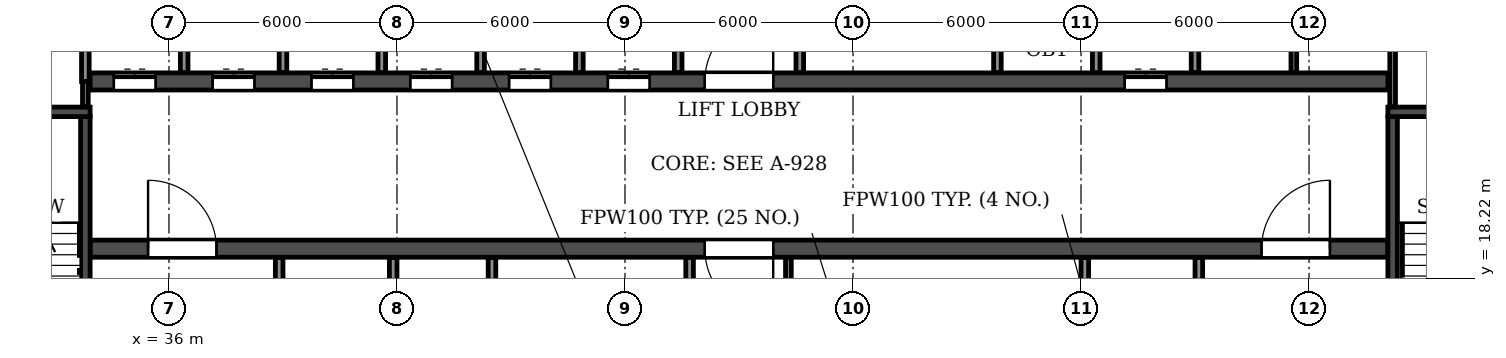
"""IFC4 building model, lengths in metres.
Left out: names, types, materials, properties, quantities, classifications, styles, units other than length and angle.
Written with IfcOpenShell. Run it as: python <this file> out.ifc"""

import sys

from ifc_helpers import new_model, si_unit, direction, frame, frame_2d, origin, place, context, subcontext, project, spatial, rectangle, extrude, element, fill, save


model = new_model("IFC4")
c1 = context("Model", 3, precision=1e-05, world=origin(), true_north=direction((0.0, 1.0)))
c2 = subcontext(c1, "Body", "Model", "MODEL_VIEW")
j1 = project(units=[si_unit("LENGTHUNIT", "METRE"), si_unit("PLANEANGLEUNIT", "RADIAN")], contexts=[c1])
p1 = place(None, origin())
s1 = spatial("IfcSite", under=j1, at=p1, CompositionType="ELEMENT")
p2 = place(p1, origin())
s2 = spatial("IfcBuilding", under=s1, at=p2, CompositionType="ELEMENT")
p3 = place(p2, frame((0.0, 0.0, 155.4)))
s3 = spatial("IfcBuildingStorey", under=s2, at=p3, CompositionType="ELEMENT", Elevation=155.4)
p4 = place(p3, frame((33.925, 19.0, 0.0), z_axis=(0.0, 0.0, 1.0), x_axis=(1.0, 0.0, 0.0)))
e1 = element("IfcWall", 1, at=p4, inside=s3, PredefinedType="SOLIDWALL", context=c2, shape_type="SweptSolid", body=[
    extrude(rectangle(XDim=34.15, YDim=0.45, at=frame_2d((17.075, 0.0))), origin(), (0.0, 0.0, 1.0), 3.0),
])
p5 = place(p4, frame((16.175, 0.0, 0.0)))
e2 = element("IfcOpeningElement", 2, at=p5, cuts=e1, PredefinedType="OPENING", context=c2, shape_type="SweptSolid", body=[
    extrude(rectangle(XDim=1.8, YDim=2.1, at=frame_2d((0.9, 1.05))), frame((0.0, 0.235, 0.0), z_axis=(0.0, -1.0, 0.0), x_axis=(1.0, 0.0, 0.0)), (0.0, 0.0, 1.0), 0.47),
])
p6 = place(p4, frame((1.525, 0.0, 0.0)))
e3 = element("IfcOpeningElement", 3, at=p6, cuts=e1, PredefinedType="OPENING", context=c2, shape_type="SweptSolid", body=[
    extrude(rectangle(XDim=1.8, YDim=2.1, at=frame_2d((0.9, 1.05))), frame((0.0, 0.235, 0.0), z_axis=(0.0, -1.0, 0.0), x_axis=(1.0, 0.0, 0.0)), (0.0, 0.0, 1.0), 0.47),
])
p7 = place(p4, frame((30.825, 0.0, 0.0)))
e4 = element("IfcOpeningElement", 4, at=p7, cuts=e1, PredefinedType="OPENING", context=c2, shape_type="SweptSolid", body=[
    extrude(rectangle(XDim=1.8, YDim=2.1, at=frame_2d((0.9, 1.05))), frame((0.0, 0.235, 0.0), z_axis=(0.0, -1.0, 0.0), x_axis=(1.0, 0.0, 0.0)), (0.0, 0.0, 1.0), 0.47),
])
p8 = place(p3, frame((33.925, 23.4, 0.0), z_axis=(0.0, 0.0, 1.0), x_axis=(1.0, 0.0, 0.0)))
e5 = element("IfcWall", 5, at=p8, inside=s3, PredefinedType="SOLIDWALL", context=c2, shape_type="SweptSolid", body=[
    extrude(rectangle(XDim=34.15, YDim=0.45, at=frame_2d((17.075, 0.0))), origin(), (0.0, 0.0, 1.0), 3.0),
])
p9 = place(p8, frame((16.175, 0.0, 0.0)))
e6 = element("IfcOpeningElement", 6, at=p9, cuts=e5, PredefinedType="OPENING", context=c2, shape_type="SweptSolid", body=[
    extrude(rectangle(XDim=1.8, YDim=2.1, at=frame_2d((0.9, 1.05))), frame((0.0, 0.235, 0.0), z_axis=(0.0, -1.0, 0.0), x_axis=(1.0, 0.0, 0.0)), (0.0, 0.0, 1.0), 0.47),
])
p10 = place(p8, frame((0.625, 0.0, 0.0)))
e7 = element("IfcOpeningElement", 7, at=p10, cuts=e5, PredefinedType="OPENING", context=c2, shape_type="SweptSolid", body=[
    extrude(rectangle(XDim=1.1, YDim=2.1, at=frame_2d((0.55, 1.05))), frame((0.0, 0.235, 0.0), z_axis=(0.0, -1.0, 0.0), x_axis=(1.0, 0.0, 0.0)), (0.0, 0.0, 1.0), 0.47),
])
p11 = place(p8, frame((3.225, 0.0, 0.0)))
e8 = element("IfcOpeningElement", 8, at=p11, cuts=e5, PredefinedType="OPENING", context=c2, shape_type="SweptSolid", body=[
    extrude(rectangle(XDim=1.1, YDim=2.1, at=frame_2d((0.55, 1.05))), frame((0.0, 0.235, 0.0), z_axis=(0.0, -1.0, 0.0), x_axis=(1.0, 0.0, 0.0)), (0.0, 0.0, 1.0), 0.47),
])
p12 = place(p8, frame((5.825, 0.0, 0.0)))
e9 = element("IfcOpeningElement", 9, at=p12, cuts=e5, PredefinedType="OPENING", context=c2, shape_type="SweptSolid", body=[
    extrude(rectangle(XDim=1.1, YDim=2.1, at=frame_2d((0.55, 1.05))), frame((0.0, 0.235, 0.0), z_axis=(0.0, -1.0, 0.0), x_axis=(1.0, 0.0, 0.0)), (0.0, 0.0, 1.0), 0.47),
])
p13 = place(p8, frame((8.425, 0.0, 0.0)))
e10 = element("IfcOpeningElement", 10, at=p13, cuts=e5, PredefinedType="OPENING", context=c2, shape_type="SweptSolid", body=[
    extrude(rectangle(XDim=1.1, YDim=2.1, at=frame_2d((0.55, 1.05))), frame((0.0, 0.235, 0.0), z_axis=(0.0, -1.0, 0.0), x_axis=(1.0, 0.0, 0.0)), (0.0, 0.0, 1.0), 0.47),
])
p14 = place(p8, frame((11.025, 0.0, 0.0)))
e11 = element("IfcOpeningElement", 11, at=p14, cuts=e5, PredefinedType="OPENING", context=c2, shape_type="SweptSolid", body=[
    extrude(rectangle(XDim=1.1, YDim=2.1, at=frame_2d((0.55, 1.05))), frame((0.0, 0.235, 0.0), z_axis=(0.0, -1.0, 0.0), x_axis=(1.0, 0.0, 0.0)), (0.0, 0.0, 1.0), 0.47),
])
p15 = place(p8, frame((13.625, 0.0, 0.0)))
e12 = element("IfcOpeningElement", 12, at=p15, cuts=e5, PredefinedType="OPENING", context=c2, shape_type="SweptSolid", body=[
    extrude(rectangle(XDim=1.1, YDim=2.1, at=frame_2d((0.55, 1.05))), frame((0.0, 0.235, 0.0), z_axis=(0.0, -1.0, 0.0), x_axis=(1.0, 0.0, 0.0)), (0.0, 0.0, 1.0), 0.47),
])
p16 = place(p8, frame((27.225, 0.0, 0.0)))
e13 = element("IfcOpeningElement", 13, at=p16, cuts=e5, PredefinedType="OPENING", context=c2, shape_type="SweptSolid", body=[
    extrude(rectangle(XDim=1.1, YDim=2.1, at=frame_2d((0.55, 1.05))), frame((0.0, 0.235, 0.0), z_axis=(0.0, -1.0, 0.0), x_axis=(1.0, 0.0, 0.0)), (0.0, 0.0, 1.0), 0.47),
])
p17 = place(p3, frame((33.8, 14.825, 0.0), z_axis=(0.0, 0.0, 1.0), x_axis=(0.0, 1.0, 0.0)))
e14 = element("IfcWall", 14, at=p17, inside=s3, PredefinedType="SOLIDWALL", context=c2, shape_type="SweptSolid", body=[
    extrude(rectangle(XDim=7.65, YDim=0.25, at=frame_2d((3.825, 0.0))), origin(), (0.0, 0.0, 1.0), 3.0),
])
p18 = place(p17, frame((0.475, 0.0, 0.0)))
e15 = element("IfcOpeningElement", 15, at=p18, cuts=e14, PredefinedType="OPENING", context=c2, shape_type="SweptSolid", body=[
    extrude(rectangle(XDim=1.0, YDim=2.1, at=frame_2d((0.5, 1.05))), frame((0.0, 0.135, 0.0), z_axis=(0.0, -1.0, 0.0), x_axis=(1.0, 0.0, 0.0)), (0.0, 0.0, 1.0), 0.27),
])
p19 = place(p3, frame((29.875, 22.6, 0.0), z_axis=(0.0, 0.0, 1.0), x_axis=(1.0, 0.0, 0.0)))
e16 = element("IfcWall", 16, at=p19, inside=s3, PredefinedType="SOLIDWALL", context=c2, shape_type="SweptSolid", body=[
    extrude(rectangle(XDim=4.05, YDim=0.25, at=frame_2d((2.025, 0.0))), origin(), (0.0, 0.0, 1.0), 3.0),
])
p20 = place(p3, frame((68.2, 14.825, 0.0), z_axis=(0.0, 0.0, 1.0), x_axis=(0.0, 1.0, 0.0)))
e17 = element("IfcWall", 17, at=p20, inside=s3, PredefinedType="SOLIDWALL", context=c2, shape_type="SweptSolid", body=[
    extrude(rectangle(XDim=7.65, YDim=0.25, at=frame_2d((3.825, 0.0))), origin(), (0.0, 0.0, 1.0), 3.0),
])
p21 = place(p20, frame((0.475, 0.0, 0.0)))
e18 = element("IfcOpeningElement", 18, at=p21, cuts=e17, PredefinedType="OPENING", context=c2, shape_type="SweptSolid", body=[
    extrude(rectangle(XDim=1.0, YDim=2.1, at=frame_2d((0.5, 1.05))), frame((0.0, 0.135, 0.0), z_axis=(0.0, -1.0, 0.0), x_axis=(1.0, 0.0, 0.0)), (0.0, 0.0, 1.0), 0.27),
])
p22 = place(p3, frame((68.075, 22.6, 0.0), z_axis=(0.0, 0.0, 1.0), x_axis=(1.0, 0.0, 0.0)))
e19 = element("IfcWall", 19, at=p22, inside=s3, PredefinedType="SOLIDWALL", context=c2, shape_type="SweptSolid", body=[
    extrude(rectangle(XDim=4.05, YDim=0.25, at=frame_2d((2.025, 0.0))), origin(), (0.0, 0.0, 1.0), 3.0),
])
for number, where, z_axis, x_axis in (
    (20, (52.3, 14.835, 0.0), (0.0, 0.0, 1.0), (0.0, 1.0, 0.0)),
    (21, (65.6, 23.635, 0.0), (0.0, 0.0, 1.0), (0.0, 1.0, 0.0)),
):
    element("IfcWall", number, at=place(p3, frame(where, z_axis=z_axis, x_axis=x_axis)), inside=s3, PredefinedType="PARTITIONING", context=c2, shape_type="SweptSolid", body=[
        extrude(rectangle(XDim=3.93, YDim=0.15, at=frame_2d((1.965, 0.0))), origin(), (0.0, 0.0, 1.0), 3.0),
    ])
for number, where, z_axis, x_axis in (
    (22, (44.5, 14.835, 0.0), (0.0, 0.0, 1.0), (0.0, 1.0, 0.0)),
    (23, (49.7, 14.835, 0.0), (0.0, 0.0, 1.0), (0.0, 1.0, 0.0)),
    (24, (52.6, 23.635, 0.0), (0.0, 0.0, 1.0), (0.0, 1.0, 0.0)),
):
    element("IfcWall", number, at=place(p3, frame(where, z_axis=z_axis, x_axis=x_axis)), inside=s3, PredefinedType="PARTITIONING", context=c2, shape_type="SweptSolid", body=[
        extrude(rectangle(XDim=3.93, YDim=0.2, at=frame_2d((1.965, 0.0))), origin(), (0.0, 0.0, 1.0), 3.0),
    ])
p23 = place(p3, frame((33.8, 22.735, 0.0), z_axis=(0.0, 0.0, 1.0), x_axis=(0.0, 1.0, 0.0)))
e25 = element("IfcWall", 25, at=p23, inside=s3, PredefinedType="PARTITIONING", context=c2, shape_type="SweptSolid", body=[
    extrude(rectangle(XDim=0.665, YDim=0.15, at=frame_2d((0.333, 0.0))), origin(), (0.0, 0.0, 1.0), 3.0),
])
p24 = place(p3, frame((68.2, 22.735, 0.0), z_axis=(0.0, 0.0, 1.0), x_axis=(0.0, 1.0, 0.0)))
e26 = element("IfcWall", 26, at=p24, inside=s3, PredefinedType="PARTITIONING", context=c2, shape_type="SweptSolid", body=[
    extrude(rectangle(XDim=4.83, YDim=0.15, at=frame_2d((2.415, 0.0))), origin(), (0.0, 0.0, 1.0), 3.0),
])
p25 = place(p3, frame((33.8, 23.4, 0.0), z_axis=(0.0, 0.0, 1.0), x_axis=(0.0, 1.0, 0.0)))
e27 = element("IfcWall", 27, at=p25, inside=s3, PredefinedType="PARTITIONING", context=c2, shape_type="SweptSolid", body=[
    extrude(rectangle(XDim=2.7, YDim=0.2, at=frame_2d((1.35, 0.0))), origin(), (0.0, 0.0, 1.0), 3.0),
])
p26 = place(p3, frame((36.4, 23.635, 0.0), z_axis=(0.0, 0.0, 1.0), x_axis=(0.0, 1.0, 0.0)))
e28 = element("IfcWall", 28, at=p26, inside=s3, PredefinedType="PARTITIONING", context=c2, shape_type="SweptSolid", body=[
    extrude(rectangle(XDim=2.465, YDim=0.2, at=frame_2d((1.232, 0.0))), origin(), (0.0, 0.0, 1.0), 3.0),
])
p27 = place(p3, frame((38.9, 14.835, 0.0), z_axis=(0.0, 0.0, 1.0), x_axis=(0.0, 1.0, 0.0)))
e29 = element("IfcWall", 29, at=p27, inside=s3, PredefinedType="PARTITIONING", context=c2, shape_type="SweptSolid", body=[
    extrude(rectangle(XDim=3.93, YDim=0.2, at=frame_2d((1.965, 0.0))), origin(), (0.0, 0.0, 1.0), 3.0),
])
p28 = place(p27, frame((1.415, 0.0, 0.0)))
e30 = element("IfcOpeningElement", 30, at=p28, cuts=e29, PredefinedType="OPENING", context=c2, shape_type="SweptSolid", body=[
    extrude(rectangle(XDim=1.1, YDim=2.1, at=frame_2d((0.55, 1.05))), frame((0.0, 0.11, 0.0), z_axis=(0.0, -1.0, 0.0), x_axis=(1.0, 0.0, 0.0)), (0.0, 0.0, 1.0), 0.22),
])
for number, where, z_axis, x_axis in (
    (31, (39.0, 23.635, 0.0), (0.0, 0.0, 1.0), (0.0, 1.0, 0.0)),
    (32, (41.6, 23.635, 0.0), (0.0, 0.0, 1.0), (0.0, 1.0, 0.0)),
):
    element("IfcWall", number, at=place(p3, frame(where, z_axis=z_axis, x_axis=x_axis)), inside=s3, PredefinedType="PARTITIONING", context=c2, shape_type="SweptSolid", body=[
        extrude(rectangle(XDim=2.465, YDim=0.2, at=frame_2d((1.232, 0.0))), origin(), (0.0, 0.0, 1.0), 3.0),
    ])
for number, where, z_axis, x_axis in (
    (33, (41.9, 14.835, 0.0), (0.0, 0.0, 1.0), (0.0, 1.0, 0.0)),
    (34, (44.2, 23.635, 0.0), (0.0, 0.0, 1.0), (0.0, 1.0, 0.0)),
    (35, (46.8, 23.635, 0.0), (0.0, 0.0, 1.0), (0.0, 1.0, 0.0)),
):
    element("IfcWall", number, at=place(p3, frame(where, z_axis=z_axis, x_axis=x_axis)), inside=s3, PredefinedType="PARTITIONING", context=c2, shape_type="SweptSolid", body=[
        extrude(rectangle(XDim=3.93, YDim=0.2, at=frame_2d((1.965, 0.0))), origin(), (0.0, 0.0, 1.0), 3.0),
    ])
for number, where, z_axis, x_axis in (
    (36, (49.4, 23.635, 0.0), (0.0, 0.0, 1.0), (0.0, 1.0, 0.0)),
    (37, (57.8, 23.635, 0.0), (0.0, 0.0, 1.0), (0.0, 1.0, 0.0)),
):
    element("IfcWall", number, at=place(p3, frame(where, z_axis=z_axis, x_axis=x_axis)), inside=s3, PredefinedType="PARTITIONING", context=c2, shape_type="SweptSolid", body=[
        extrude(rectangle(XDim=2.465, YDim=0.2, at=frame_2d((1.232, 0.0))), origin(), (0.0, 0.0, 1.0), 3.0),
    ])
p29 = place(p3, frame((60.1, 14.835, 0.0), z_axis=(0.0, 0.0, 1.0), x_axis=(0.0, 1.0, 0.0)))
e38 = element("IfcWall", 38, at=p29, inside=s3, PredefinedType="PARTITIONING", context=c2, shape_type="SweptSolid", body=[
    extrude(rectangle(XDim=3.93, YDim=0.2, at=frame_2d((1.965, 0.0))), origin(), (0.0, 0.0, 1.0), 3.0),
])
for number, where, z_axis, x_axis in (
    (39, (60.4, 23.635, 0.0), (0.0, 0.0, 1.0), (0.0, 1.0, 0.0)),
    (40, (63.0, 23.635, 0.0), (0.0, 0.0, 1.0), (0.0, 1.0, 0.0)),
):
    element("IfcWall", number, at=place(p3, frame(where, z_axis=z_axis, x_axis=x_axis)), inside=s3, PredefinedType="PARTITIONING", context=c2, shape_type="SweptSolid", body=[
        extrude(rectangle(XDim=2.465, YDim=0.2, at=frame_2d((1.232, 0.0))), origin(), (0.0, 0.0, 1.0), 3.0),
    ])
p30 = place(p3, frame((63.1, 14.835, 0.0), z_axis=(0.0, 0.0, 1.0), x_axis=(0.0, 1.0, 0.0)))
e41 = element("IfcWall", 41, at=p30, inside=s3, PredefinedType="PARTITIONING", context=c2, shape_type="SweptSolid", body=[
    extrude(rectangle(XDim=3.93, YDim=0.2, at=frame_2d((1.965, 0.0))), origin(), (0.0, 0.0, 1.0), 3.0),
])
p31 = place(p30, frame((1.415, 0.0, 0.0)))
e42 = element("IfcOpeningElement", 42, at=p31, cuts=e41, PredefinedType="OPENING", context=c2, shape_type="SweptSolid", body=[
    extrude(rectangle(XDim=1.1, YDim=2.1, at=frame_2d((0.55, 1.05))), frame((0.0, 0.11, 0.0), z_axis=(0.0, -1.0, 0.0), x_axis=(1.0, 0.0, 0.0)), (0.0, 0.0, 1.0), 0.22),
])
p32 = place(p9, origin())
e43 = element("IfcDoor", 43, at=p32, inside=s3, OperationType="DOUBLE_DOOR_SINGLE_SWING", PredefinedType="DOOR", context=c2, shape_type="SweptSolid", body=[
    extrude(rectangle(XDim=1.8, YDim=2.1, at=frame_2d((0.9, 1.05))), frame((0.0, 0.025, 0.0), z_axis=(0.0, -1.0, 0.0), x_axis=(1.0, 0.0, 0.0)), (0.0, 0.0, 1.0), 0.05),
])
fill(e6, e43)
p33 = place(p5, frame((1.8, 0.0, 0.0), z_axis=(0.0, 0.0, 1.0), x_axis=(-1.0, 0.0, 0.0)))
e44 = element("IfcDoor", 44, at=p33, inside=s3, OperationType="DOUBLE_DOOR_SINGLE_SWING", PredefinedType="DOOR", context=c2, shape_type="SweptSolid", body=[
    extrude(rectangle(XDim=1.8, YDim=2.1, at=frame_2d((0.9, 1.05))), frame((0.0, 0.025, 0.0), z_axis=(0.0, -1.0, 0.0), x_axis=(1.0, 0.0, 0.0)), (0.0, 0.0, 1.0), 0.05),
])
fill(e2, e44)
p34 = place(p10, origin())
e45 = element("IfcDoor", 45, at=p34, inside=s3, OperationType="DOUBLE_DOOR_SLIDING", PredefinedType="DOOR", context=c2, shape_type="SweptSolid", body=[
    extrude(rectangle(XDim=1.1, YDim=2.1, at=frame_2d((0.55, 1.05))), frame((0.0, 0.025, 0.0), z_axis=(0.0, -1.0, 0.0), x_axis=(1.0, 0.0, 0.0)), (0.0, 0.0, 1.0), 0.05),
])
fill(e7, e45)
p35 = place(p6, origin())
e46 = element("IfcDoor", 46, at=p35, inside=s3, OperationType="DOUBLE_DOOR_SINGLE_SWING", PredefinedType="DOOR", context=c2, shape_type="SweptSolid", body=[
    extrude(rectangle(XDim=1.8, YDim=2.1, at=frame_2d((0.9, 1.05))), frame((0.0, 0.025, 0.0), z_axis=(0.0, -1.0, 0.0), x_axis=(1.0, 0.0, 0.0)), (0.0, 0.0, 1.0), 0.05),
])
fill(e3, e46)
p36 = place(p11, origin())
e47 = element("IfcDoor", 47, at=p36, inside=s3, OperationType="DOUBLE_DOOR_SLIDING", PredefinedType="DOOR", context=c2, shape_type="SweptSolid", body=[
    extrude(rectangle(XDim=1.1, YDim=2.1, at=frame_2d((0.55, 1.05))), frame((0.0, 0.025, 0.0), z_axis=(0.0, -1.0, 0.0), x_axis=(1.0, 0.0, 0.0)), (0.0, 0.0, 1.0), 0.05),
])
fill(e8, e47)
p37 = place(p12, origin())
e48 = element("IfcDoor", 48, at=p37, inside=s3, OperationType="DOUBLE_DOOR_SLIDING", PredefinedType="DOOR", context=c2, shape_type="SweptSolid", body=[
    extrude(rectangle(XDim=1.1, YDim=2.1, at=frame_2d((0.55, 1.05))), frame((0.0, 0.025, 0.0), z_axis=(0.0, -1.0, 0.0), x_axis=(1.0, 0.0, 0.0)), (0.0, 0.0, 1.0), 0.05),
])
fill(e9, e48)
p38 = place(p13, origin())
e49 = element("IfcDoor", 49, at=p38, inside=s3, OperationType="DOUBLE_DOOR_SLIDING", PredefinedType="DOOR", context=c2, shape_type="SweptSolid", body=[
    extrude(rectangle(XDim=1.1, YDim=2.1, at=frame_2d((0.55, 1.05))), frame((0.0, 0.025, 0.0), z_axis=(0.0, -1.0, 0.0), x_axis=(1.0, 0.0, 0.0)), (0.0, 0.0, 1.0), 0.05),
])
fill(e10, e49)
p39 = place(p14, origin())
e50 = element("IfcDoor", 50, at=p39, inside=s3, OperationType="DOUBLE_DOOR_SLIDING", PredefinedType="DOOR", context=c2, shape_type="SweptSolid", body=[
    extrude(rectangle(XDim=1.1, YDim=2.1, at=frame_2d((0.55, 1.05))), frame((0.0, 0.025, 0.0), z_axis=(0.0, -1.0, 0.0), x_axis=(1.0, 0.0, 0.0)), (0.0, 0.0, 1.0), 0.05),
])
fill(e11, e50)
p40 = place(p15, origin())
e51 = element("IfcDoor", 51, at=p40, inside=s3, OperationType="DOUBLE_DOOR_SLIDING", PredefinedType="DOOR", context=c2, shape_type="SweptSolid", body=[
    extrude(rectangle(XDim=1.1, YDim=2.1, at=frame_2d((0.55, 1.05))), frame((0.0, 0.025, 0.0), z_axis=(0.0, -1.0, 0.0), x_axis=(1.0, 0.0, 0.0)), (0.0, 0.0, 1.0), 0.05),
])
fill(e12, e51)
p41 = place(p16, origin())
e52 = element("IfcDoor", 52, at=p41, inside=s3, OperationType="DOUBLE_DOOR_SLIDING", PredefinedType="DOOR", context=c2, shape_type="SweptSolid", body=[
    extrude(rectangle(XDim=1.1, YDim=2.1, at=frame_2d((0.55, 1.05))), frame((0.0, 0.025, 0.0), z_axis=(0.0, -1.0, 0.0), x_axis=(1.0, 0.0, 0.0)), (0.0, 0.0, 1.0), 0.05),
])
fill(e13, e52)
p42 = place(p7, origin())
e53 = element("IfcDoor", 53, at=p42, inside=s3, OperationType="DOUBLE_DOOR_SINGLE_SWING", PredefinedType="DOOR", context=c2, shape_type="SweptSolid", body=[
    extrude(rectangle(XDim=1.8, YDim=2.1, at=frame_2d((0.9, 1.05))), frame((0.0, 0.025, 0.0), z_axis=(0.0, -1.0, 0.0), x_axis=(1.0, 0.0, 0.0)), (0.0, 0.0, 1.0), 0.05),
])
fill(e4, e53)
save(model, sys.argv[1])
